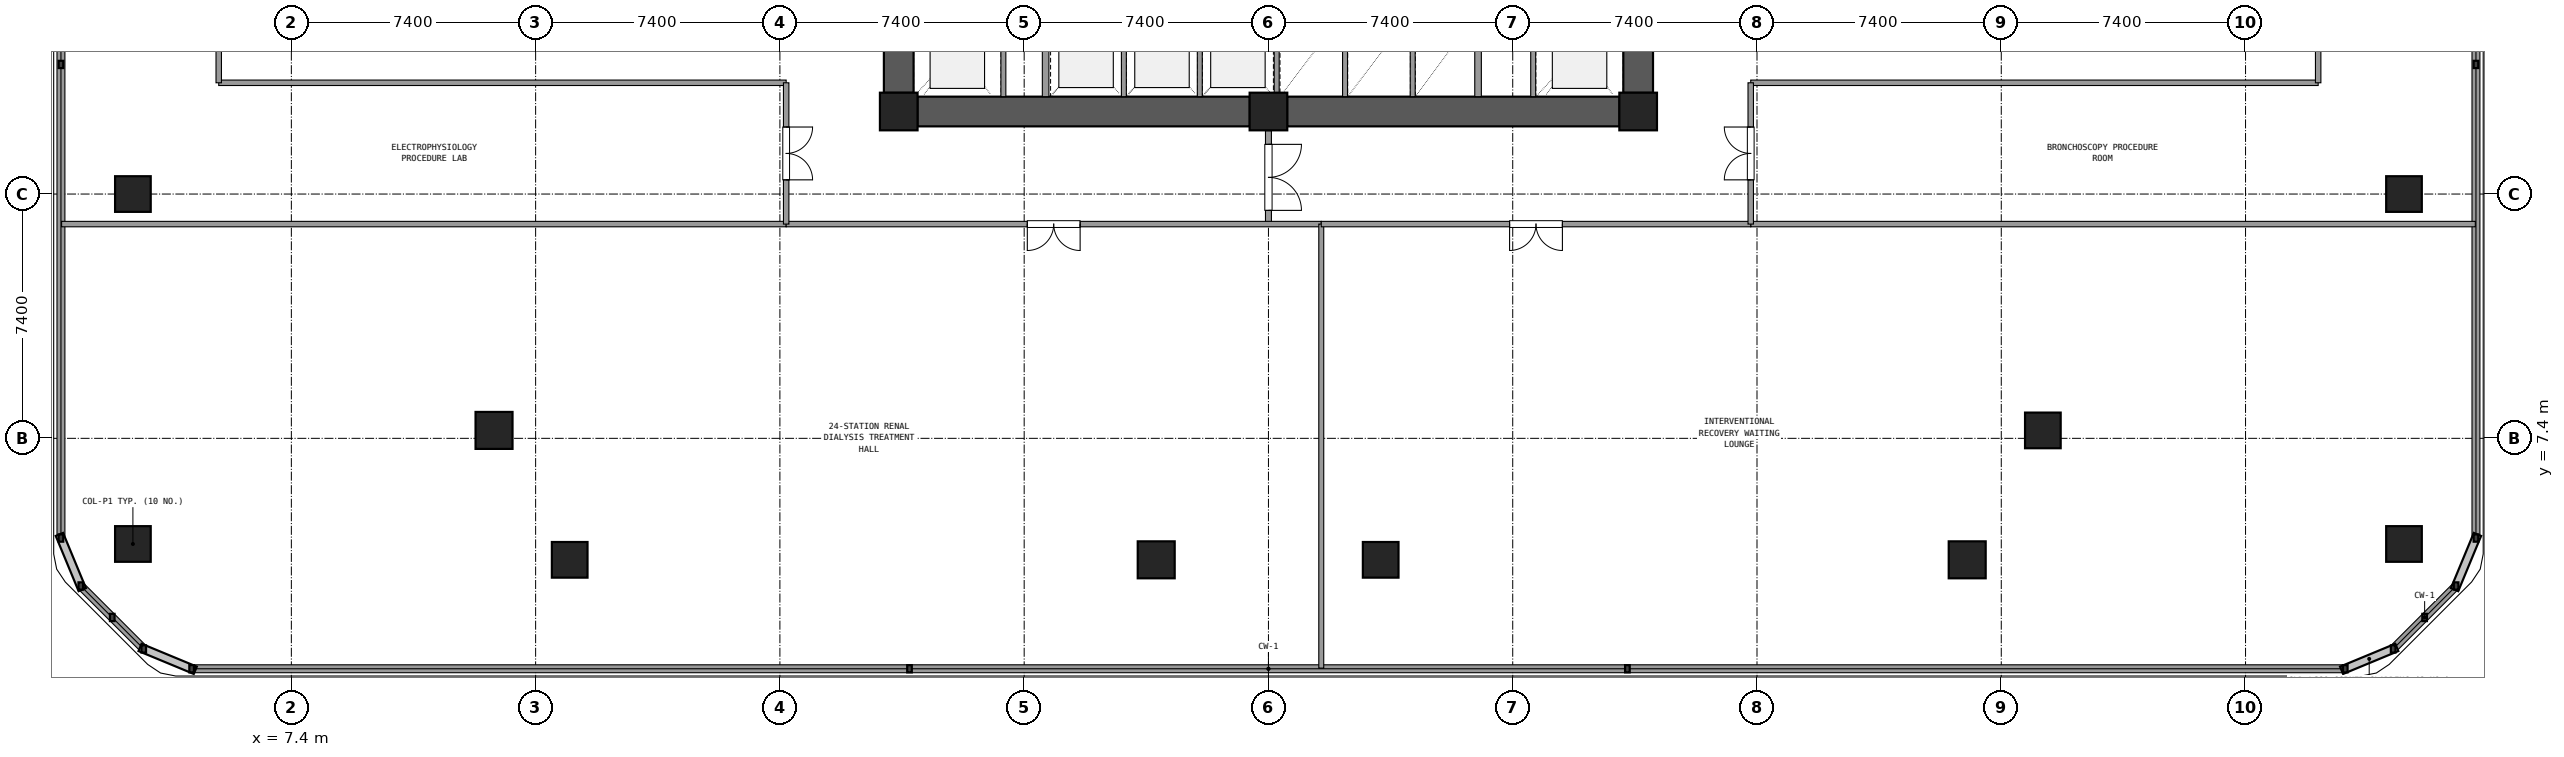
"""IFC4 building model, lengths in metres.
Left out: names, types, materials, properties, quantities, classifications, styles, units other than length and angle.
Written with IfcOpenShell. Run it as: python <this file> out.ifc"""

import sys

from ifc_helpers import new_model, si_unit, direction, frame, frame_2d, origin, origin_2d, place, context, subcontext, project, spatial, rectangle, circle, extrude, element, fill, save


model = new_model("IFC4")
c1 = context("Model", 3, precision=1e-05, world=origin(), true_north=direction((0.0, 1.0)))
c2 = subcontext(c1, "Body", "Model", "MODEL_VIEW")
j1 = project(units=[si_unit("LENGTHUNIT", "METRE"), si_unit("PLANEANGLEUNIT", "RADIAN")], contexts=[c1])
p1 = place(None, origin())
s1 = spatial("IfcSite", under=j1, at=p1, CompositionType="ELEMENT")
p2 = place(p1, origin())
s2 = spatial("IfcBuilding", under=s1, at=p2, CompositionType="ELEMENT")
p3 = place(p2, frame((0.0, 0.0, 14.4)))
s3 = spatial("IfcBuildingStorey", under=s2, at=p3, CompositionType="ELEMENT", Elevation=14.4)
for number, where, z_axis, x_axis in (
    (1, (25.8, 17.3, 0.0), (0.0, 0.0, 1.0), (1.0, 0.0, 0.0)),
    (2, (37.0, 17.3, 0.0), (0.0, 0.0, 1.0), (1.0, 0.0, 0.0)),
    (3, (48.2, 17.3, 0.0), (0.0, 0.0, 1.0), (1.0, 0.0, 0.0)),
):
    element("IfcColumn", number, at=place(p3, frame(where, z_axis=z_axis, x_axis=x_axis)), inside=s3, PredefinedType="COLUMN", context=c2, shape_type="SweptSolid", body=[
        extrude(rectangle(XDim=1.14, YDim=1.14, at=origin_2d()), origin(), (0.0, 0.0, 1.0), 4.5),
    ])
for number, where, z_axis, x_axis in (
    (4, (26.365, 17.3, 0.0), (0.0, 0.0, 1.0), (1.0, 0.0, 0.0)),
    (5, (37.565, 17.3, 0.0), (0.0, 0.0, 1.0), (1.0, 0.0, 0.0)),
):
    element("IfcWall", number, at=place(p3, frame(where, z_axis=z_axis, x_axis=x_axis)), inside=s3, PredefinedType="SHEAR", context=c2, shape_type="SweptSolid", body=[
        extrude(rectangle(XDim=10.07, YDim=0.9, at=frame_2d((5.035, 0.0))), origin(), (0.0, 0.0, 1.0), 4.2),
    ])
p4 = place(p3, frame((48.2, 17.865, 0.0), z_axis=(0.0, 0.0, 1.0), x_axis=(0.0, 1.0, 0.0)))
e6 = element("IfcWall", 6, at=p4, inside=s3, PredefinedType="SHEAR", context=c2, shape_type="SweptSolid", body=[
    extrude(rectangle(XDim=7.47, YDim=0.9, at=frame_2d((3.735, 0.0))), origin(), (0.0, 0.0, 1.0), 4.2),
])
p5 = place(p4, frame((4.185, 0.0, 0.0)))
e7 = element("IfcOpeningElement", 7, at=p5, cuts=e6, PredefinedType="OPENING", context=c2, shape_type="SweptSolid", body=[
    extrude(rectangle(XDim=1.2, YDim=2.15, at=frame_2d((0.6, 1.075))), frame((0.0, 0.46, 0.0), z_axis=(0.0, -1.0, 0.0), x_axis=(1.0, 0.0, 0.0)), (0.0, 0.0, 1.0), 0.92),
])
p6 = place(p3, frame((25.8, 25.335, 0.0), z_axis=(0.0, 0.0, 1.0), x_axis=(0.0, -1.0, 0.0)))
e8 = element("IfcWall", 8, at=p6, inside=s3, PredefinedType="SHEAR", context=c2, shape_type="SweptSolid", body=[
    extrude(rectangle(XDim=7.47, YDim=0.9, at=frame_2d((3.735, 0.0))), origin(), (0.0, 0.0, 1.0), 4.2),
])
p7 = place(p6, frame((2.085, 0.0, 0.0)))
e9 = element("IfcOpeningElement", 9, at=p7, cuts=e8, PredefinedType="OPENING", context=c2, shape_type="SweptSolid", body=[
    extrude(rectangle(XDim=1.2, YDim=2.15, at=frame_2d((0.6, 1.075))), frame((0.0, 0.46, 0.0), z_axis=(0.0, -1.0, 0.0), x_axis=(1.0, 0.0, 0.0)), (0.0, 0.0, 1.0), 0.92),
])
p8 = place(p3, frame((13.54, 7.64, 0.0), z_axis=(0.0, 0.0, 1.0), x_axis=(1.0, 0.0, 0.0)))
e10 = element("IfcColumn", 10, at=p8, inside=s3, PredefinedType="COLUMN", context=c2, shape_type="SweptSolid", body=[
    extrude(circle(Radius=0.56, at=origin_2d()), origin(), (0.0, 0.0, 1.0), 4.5),
])
p9 = place(p3, frame((15.832, 3.72, 0.0), z_axis=(0.0, 0.0, 1.0), x_axis=(1.0, 0.0, 0.0)))
e11 = element("IfcColumn", 11, at=p9, inside=s3, PredefinedType="COLUMN", context=c2, shape_type="SweptSolid", body=[
    extrude(rectangle(XDim=1.08, YDim=1.08, at=origin_2d()), origin(), (0.0, 0.0, 1.0), 4.5),
])
p10 = place(p3, frame((33.6, 3.72, 0.0), z_axis=(0.0, 0.0, 1.0), x_axis=(1.0, 0.0, 0.0)))
e12 = element("IfcColumn", 12, at=p10, inside=s3, PredefinedType="COLUMN", context=c2, shape_type="SweptSolid", body=[
    extrude(circle(Radius=0.56, at=origin_2d()), origin(), (0.0, 0.0, 1.0), 4.5),
])
p11 = place(p3, frame((40.4, 3.72, 0.0), z_axis=(0.0, 0.0, 1.0), x_axis=(1.0, 0.0, 0.0)))
e13 = element("IfcColumn", 13, at=p11, inside=s3, PredefinedType="COLUMN", context=c2, shape_type="SweptSolid", body=[
    extrude(rectangle(XDim=1.08, YDim=1.08, at=origin_2d()), origin(), (0.0, 0.0, 1.0), 4.5),
])
p12 = place(p3, frame((58.168, 3.72, 0.0), z_axis=(0.0, 0.0, 1.0), x_axis=(1.0, 0.0, 0.0)))
e14 = element("IfcColumn", 14, at=p12, inside=s3, PredefinedType="COLUMN", context=c2, shape_type="SweptSolid", body=[
    extrude(circle(Radius=0.56, at=origin_2d()), origin(), (0.0, 0.0, 1.0), 4.5),
])
for number, where, z_axis, x_axis in (
    (15, (60.46, 7.64, 0.0), (0.0, 0.0, 1.0), (1.0, 0.0, 0.0)),
    (16, (2.6, 4.2, 0.0), (0.0, 0.0, 1.0), (1.0, 0.0, 0.0)),
    (17, (2.6, 14.8, 0.0), (0.0, 0.0, 1.0), (1.0, 0.0, 0.0)),
    (18, (71.4, 4.2, 0.0), (0.0, 0.0, 1.0), (1.0, 0.0, 0.0)),
    (19, (71.4, 14.8, 0.0), (0.0, 0.0, 1.0), (1.0, 0.0, 0.0)),
):
    element("IfcColumn", number, at=place(p3, frame(where, z_axis=z_axis, x_axis=x_axis)), inside=s3, PredefinedType="COLUMN", context=c2, shape_type="SweptSolid", body=[
        extrude(rectangle(XDim=1.08, YDim=1.08, at=origin_2d()), origin(), (0.0, 0.0, 1.0), 4.5),
    ])
p13 = place(p3, frame((4.379, 0.42, 0.0), z_axis=(0.0, 0.0, 1.0), x_axis=(1.0, 0.0, 0.0)))
e20 = element("IfcWall", 20, at=p13, inside=s3, PredefinedType="SOLIDWALL", context=c2, shape_type="SweptSolid", body=[
    extrude(rectangle(XDim=65.242, YDim=0.24, at=frame_2d((32.621, 0.0))), origin(), (0.0, 0.0, 1.0), 0.85),
])
p14 = place(p3, frame((71.072, 1.021, 0.0), z_axis=(0.0, 0.0, 1.0), x_axis=(0.707106781187, 0.707106781187, 0.0)))
e21 = element("IfcWall", 21, at=p14, inside=s3, PredefinedType="SOLIDWALL", context=c2, shape_type="SweptSolid", body=[
    extrude(rectangle(XDim=2.697, YDim=0.24, at=frame_2d((1.348, 0.0))), origin(), (0.0, 0.0, 1.0), 0.85),
])
for number, where, z_axis, x_axis in (
    (22, (73.58, 4.379, 0.0), (0.0, 0.0, 1.0), (0.0, 1.0, 0.0)),
    (23, (0.42, 47.421, 0.0), (0.0, 0.0, 1.0), (0.0, -1.0, 0.0)),
):
    element("IfcWall", number, at=place(p3, frame(where, z_axis=z_axis, x_axis=x_axis)), inside=s3, PredefinedType="SOLIDWALL", context=c2, shape_type="SweptSolid", body=[
        extrude(rectangle(XDim=43.042, YDim=0.24, at=frame_2d((21.521, 0.0))), origin(), (0.0, 0.0, 1.0), 0.85),
    ])
p15 = place(p3, frame((1.021, 2.928, 0.0), z_axis=(0.0, 0.0, 1.0), x_axis=(0.707106781187, -0.707106781187, 0.0)))
e24 = element("IfcWall", 24, at=p15, inside=s3, PredefinedType="SOLIDWALL", context=c2, shape_type="SweptSolid", body=[
    extrude(rectangle(XDim=2.697, YDim=0.24, at=frame_2d((1.348, 0.0))), origin(), (0.0, 0.0, 1.0), 0.85),
])
p16 = place(p3, frame((30.25, 17.75, 0.0), z_axis=(0.0, 0.0, 1.0), x_axis=(0.0, 1.0, 0.0)))
e25 = element("IfcWall", 25, at=p16, inside=s3, PredefinedType="SOLIDWALL", context=c2, shape_type="SweptSolid", body=[
    extrude(rectangle(XDim=6.9, YDim=0.2, at=frame_2d((3.45, 0.0))), origin(), (0.0, 0.0, 1.0), 3.21),
])
p17 = place(p16, frame((4.15, 0.0, 0.0)))
e26 = element("IfcOpeningElement", 26, at=p17, cuts=e25, PredefinedType="OPENING", context=c2, shape_type="SweptSolid", body=[
    extrude(rectangle(XDim=1.2, YDim=2.15, at=frame_2d((0.6, 1.075))), frame((0.0, 0.11, 0.0), z_axis=(0.0, -1.0, 0.0), x_axis=(1.0, 0.0, 0.0)), (0.0, 0.0, 1.0), 0.22),
])
p18 = place(p3, frame((28.97, 17.75, 0.0), z_axis=(0.0, 0.0, 1.0), x_axis=(0.0, 1.0, 0.0)))
e27 = element("IfcWall", 27, at=p18, inside=s3, PredefinedType="PARTITIONING", context=c2, shape_type="SweptSolid", body=[
    extrude(rectangle(XDim=2.95, YDim=0.15, at=frame_2d((1.475, 0.0))), origin(), (0.0, 0.0, 1.0), 3.21),
])
p19 = place(p3, frame((43.35, 17.75, 0.0), z_axis=(0.0, 0.0, 1.0), x_axis=(0.0, 1.0, 0.0)))
e28 = element("IfcWall", 28, at=p19, inside=s3, PredefinedType="SOLIDWALL", context=c2, shape_type="SweptSolid", body=[
    extrude(rectangle(XDim=6.9, YDim=0.2, at=frame_2d((3.45, 0.0))), origin(), (0.0, 0.0, 1.0), 3.21),
])
p20 = place(p19, frame((4.15, 0.0, 0.0)))
e29 = element("IfcOpeningElement", 29, at=p20, cuts=e28, PredefinedType="OPENING", context=c2, shape_type="SweptSolid", body=[
    extrude(rectangle(XDim=1.2, YDim=2.15, at=frame_2d((0.6, 1.075))), frame((0.0, 0.11, 0.0), z_axis=(0.0, -1.0, 0.0), x_axis=(1.0, 0.0, 0.0)), (0.0, 0.0, 1.0), 0.22),
])
p21 = place(p3, frame((45.02, 17.75, 0.0), z_axis=(0.0, 0.0, 1.0), x_axis=(0.0, 1.0, 0.0)))
e30 = element("IfcWall", 30, at=p21, inside=s3, PredefinedType="PARTITIONING", context=c2, shape_type="SweptSolid", body=[
    extrude(rectangle(XDim=2.95, YDim=0.15, at=frame_2d((1.475, 0.0))), origin(), (0.0, 0.0, 1.0), 3.21),
])
for number, where, z_axis, x_axis in (
    (31, (32.62, 17.75, 0.0), (0.0, 0.0, 1.0), (0.0, 1.0, 0.0)),
    (32, (34.92, 17.75, 0.0), (0.0, 0.0, 1.0), (0.0, 1.0, 0.0)),
    (33, (39.32, 17.75, 0.0), (0.0, 0.0, 1.0), (0.0, 1.0, 0.0)),
    (34, (41.37, 17.75, 0.0), (0.0, 0.0, 1.0), (0.0, 1.0, 0.0)),
):
    element("IfcWall", number, at=place(p3, frame(where, z_axis=z_axis, x_axis=x_axis)), inside=s3, PredefinedType="PARTITIONING", context=c2, shape_type="SweptSolid", body=[
        extrude(rectangle(XDim=2.61, YDim=0.15, at=frame_2d((1.305, 0.0))), origin(), (0.0, 0.0, 1.0), 3.21),
    ])
p22 = place(p3, frame((37.25, 17.75, 0.0), z_axis=(0.0, 0.0, 1.0), x_axis=(0.0, 1.0, 0.0)))
e35 = element("IfcWall", 35, at=p22, inside=s3, PredefinedType="PARTITIONING", context=c2, shape_type="SweptSolid", body=[
    extrude(rectangle(XDim=2.73, YDim=0.15, at=frame_2d((1.365, 0.0))), origin(), (0.0, 0.0, 1.0), 3.21),
])
p23 = place(p3, frame((37.0, 13.89, 0.0), z_axis=(0.0, 0.0, 1.0), x_axis=(0.0, 1.0, 0.0)))
e36 = element("IfcWall", 36, at=p23, inside=s3, PredefinedType="PARTITIONING", context=c2, shape_type="SweptSolid", body=[
    extrude(rectangle(XDim=2.83, YDim=0.18, at=frame_2d((1.415, 0.0))), origin(), (0.0, 0.0, 1.0), 3.21),
])
p24 = place(p23, frame((0.415, 0.0, 0.0)))
e37 = element("IfcOpeningElement", 37, at=p24, cuts=e36, PredefinedType="OPENING", context=c2, shape_type="SweptSolid", body=[
    extrude(rectangle(XDim=2.0, YDim=2.2, at=frame_2d((1.0, 1.1))), frame((0.0, 0.1, 0.0), z_axis=(0.0, -1.0, 0.0), x_axis=(1.0, 0.0, 0.0)), (0.0, 0.0, 1.0), 0.2),
])
for number, where, z_axis, x_axis in (
    (38, (0.44, 13.89, 0.0), (0.0, 0.0, 1.0), (1.0, 0.0, 0.0)),
    (39, (51.61, 13.89, 0.0), (0.0, 0.0, 1.0), (1.0, 0.0, 0.0)),
):
    element("IfcWall", number, at=place(p3, frame(where, z_axis=z_axis, x_axis=x_axis)), inside=s3, PredefinedType="PARTITIONING", context=c2, shape_type="SweptSolid", body=[
        extrude(rectangle(XDim=21.95, YDim=0.165, at=frame_2d((10.975, 0.0))), origin(), (0.0, 0.0, 1.0), 3.21),
    ])
p25 = place(p3, frame((5.2, 18.17, 0.0), z_axis=(0.0, 0.0, 1.0), x_axis=(1.0, 0.0, 0.0)))
e40 = element("IfcWall", 40, at=p25, inside=s3, PredefinedType="PARTITIONING", context=c2, shape_type="SweptSolid", body=[
    extrude(rectangle(XDim=17.19, YDim=0.165, at=frame_2d((8.595, 0.0))), origin(), (0.0, 0.0, 1.0), 3.21),
])
p26 = place(p3, frame((5.2, 18.17, 0.0), z_axis=(0.0, 0.0, 1.0), x_axis=(0.0, 1.0, 0.0)))
e41 = element("IfcWall", 41, at=p26, inside=s3, PredefinedType="PARTITIONING", context=c2, shape_type="SweptSolid", body=[
    extrude(rectangle(XDim=2.93, YDim=0.165, at=frame_2d((1.465, 0.0))), origin(), (0.0, 0.0, 1.0), 3.21),
])
p27 = place(p3, frame((51.61, 18.17, 0.0), z_axis=(0.0, 0.0, 1.0), x_axis=(1.0, 0.0, 0.0)))
e42 = element("IfcWall", 42, at=p27, inside=s3, PredefinedType="PARTITIONING", context=c2, shape_type="SweptSolid", body=[
    extrude(rectangle(XDim=17.19, YDim=0.165, at=frame_2d((8.595, 0.0))), origin(), (0.0, 0.0, 1.0), 3.21),
])
p28 = place(p3, frame((68.8, 18.17, 0.0), z_axis=(0.0, 0.0, 1.0), x_axis=(0.0, 1.0, 0.0)))
e43 = element("IfcWall", 43, at=p28, inside=s3, PredefinedType="PARTITIONING", context=c2, shape_type="SweptSolid", body=[
    extrude(rectangle(XDim=2.93, YDim=0.165, at=frame_2d((1.465, 0.0))), origin(), (0.0, 0.0, 1.0), 3.21),
])
p29 = place(p3, frame((22.39, 13.89, 0.0), z_axis=(0.0, 0.0, 1.0), x_axis=(1.0, 0.0, 0.0)))
e44 = element("IfcWall", 44, at=p29, inside=s3, PredefinedType="PARTITIONING", context=c2, shape_type="SweptSolid", body=[
    extrude(rectangle(XDim=16.21, YDim=0.165, at=frame_2d((8.105, 0.0))), origin(), (0.0, 0.0, 1.0), 3.21),
])
p30 = place(p29, frame((7.305, 0.0, 0.0)))
e45 = element("IfcOpeningElement", 45, at=p30, cuts=e44, PredefinedType="OPENING", context=c2, shape_type="SweptSolid", body=[
    extrude(rectangle(XDim=1.6, YDim=2.2, at=frame_2d((0.8, 1.1))), frame((0.0, 0.093, 0.0), z_axis=(0.0, -1.0, 0.0), x_axis=(1.0, 0.0, 0.0)), (0.0, 0.0, 1.0), 0.185),
])
p31 = place(p3, frame((38.6, 0.44, 0.0), z_axis=(0.0, 0.0, 1.0), x_axis=(0.0, 1.0, 0.0)))
e46 = element("IfcWall", 46, at=p31, inside=s3, PredefinedType="PARTITIONING", context=c2, shape_type="SweptSolid", body=[
    extrude(rectangle(XDim=13.45, YDim=0.15, at=frame_2d((6.725, 0.0))), origin(), (0.0, 0.0, 1.0), 3.21),
])
p32 = place(p3, frame((38.6, 13.89, 0.0), z_axis=(0.0, 0.0, 1.0), x_axis=(1.0, 0.0, 0.0)))
e47 = element("IfcWall", 47, at=p32, inside=s3, PredefinedType="PARTITIONING", context=c2, shape_type="SweptSolid", body=[
    extrude(rectangle(XDim=13.01, YDim=0.165, at=frame_2d((6.505, 0.0))), origin(), (0.0, 0.0, 1.0), 3.21),
])
p33 = place(p32, frame((5.705, 0.0, 0.0)))
e48 = element("IfcOpeningElement", 48, at=p33, cuts=e47, PredefinedType="OPENING", context=c2, shape_type="SweptSolid", body=[
    extrude(rectangle(XDim=1.6, YDim=2.2, at=frame_2d((0.8, 1.1))), frame((0.0, 0.093, 0.0), z_axis=(0.0, -1.0, 0.0), x_axis=(1.0, 0.0, 0.0)), (0.0, 0.0, 1.0), 0.185),
])
p34 = place(p3, frame((22.39, 13.89, 0.0), z_axis=(0.0, 0.0, 1.0), x_axis=(0.0, 1.0, 0.0)))
e49 = element("IfcWall", 49, at=p34, inside=s3, PredefinedType="PARTITIONING", context=c2, shape_type="SweptSolid", body=[
    extrude(rectangle(XDim=4.28, YDim=0.165, at=frame_2d((2.14, 0.0))), origin(), (0.0, 0.0, 1.0), 3.21),
])
p35 = place(p34, frame((1.34, 0.0, 0.0)))
e50 = element("IfcOpeningElement", 50, at=p35, cuts=e49, PredefinedType="OPENING", context=c2, shape_type="SweptSolid", body=[
    extrude(rectangle(XDim=1.6, YDim=2.2, at=frame_2d((0.8, 1.1))), frame((0.0, 0.093, 0.0), z_axis=(0.0, -1.0, 0.0), x_axis=(1.0, 0.0, 0.0)), (0.0, 0.0, 1.0), 0.185),
])
p36 = place(p3, frame((51.61, 13.89, 0.0), z_axis=(0.0, 0.0, 1.0), x_axis=(0.0, 1.0, 0.0)))
e51 = element("IfcWall", 51, at=p36, inside=s3, PredefinedType="PARTITIONING", context=c2, shape_type="SweptSolid", body=[
    extrude(rectangle(XDim=4.28, YDim=0.165, at=frame_2d((2.14, 0.0))), origin(), (0.0, 0.0, 1.0), 3.21),
])
p37 = place(p36, frame((1.34, 0.0, 0.0)))
e52 = element("IfcOpeningElement", 52, at=p37, cuts=e51, PredefinedType="OPENING", context=c2, shape_type="SweptSolid", body=[
    extrude(rectangle(XDim=1.6, YDim=2.2, at=frame_2d((0.8, 1.1))), frame((0.0, 0.093, 0.0), z_axis=(0.0, -1.0, 0.0), x_axis=(1.0, 0.0, 0.0)), (0.0, 0.0, 1.0), 0.185),
])
p38 = place(p24, frame((2.0, 0.0, 0.0), z_axis=(0.0, 0.0, 1.0), x_axis=(-1.0, 0.0, 0.0)))
e53 = element("IfcDoor", 53, at=p38, inside=s3, OperationType="DOUBLE_DOOR_SINGLE_SWING", PredefinedType="DOOR", context=c2, shape_type="SweptSolid", body=[
    extrude(rectangle(XDim=2.0, YDim=2.2, at=frame_2d((1.0, 1.1))), frame((0.0, 0.025, 0.0), z_axis=(0.0, -1.0, 0.0), x_axis=(1.0, 0.0, 0.0)), (0.0, 0.0, 1.0), 0.05),
])
fill(e37, e53)
p39 = place(p30, frame((1.6, 0.0, 0.0), z_axis=(0.0, 0.0, 1.0), x_axis=(-1.0, 0.0, 0.0)))
e54 = element("IfcDoor", 54, at=p39, inside=s3, OperationType="DOUBLE_DOOR_SINGLE_SWING", PredefinedType="DOOR", context=c2, shape_type="SweptSolid", body=[
    extrude(rectangle(XDim=1.6, YDim=2.2, at=frame_2d((0.8, 1.1))), frame((0.0, 0.025, 0.0), z_axis=(0.0, -1.0, 0.0), x_axis=(1.0, 0.0, 0.0)), (0.0, 0.0, 1.0), 0.05),
])
fill(e45, e54)
p40 = place(p33, frame((1.6, 0.0, 0.0), z_axis=(0.0, 0.0, 1.0), x_axis=(-1.0, 0.0, 0.0)))
e55 = element("IfcDoor", 55, at=p40, inside=s3, OperationType="DOUBLE_DOOR_SINGLE_SWING", PredefinedType="DOOR", context=c2, shape_type="SweptSolid", body=[
    extrude(rectangle(XDim=1.6, YDim=2.2, at=frame_2d((0.8, 1.1))), frame((0.0, 0.025, 0.0), z_axis=(0.0, -1.0, 0.0), x_axis=(1.0, 0.0, 0.0)), (0.0, 0.0, 1.0), 0.05),
])
fill(e48, e55)
p41 = place(p35, frame((1.6, 0.0, 0.0), z_axis=(0.0, 0.0, 1.0), x_axis=(-1.0, 0.0, 0.0)))
e56 = element("IfcDoor", 56, at=p41, inside=s3, OperationType="DOUBLE_DOOR_SINGLE_SWING", PredefinedType="DOOR", context=c2, shape_type="SweptSolid", body=[
    extrude(rectangle(XDim=1.6, YDim=2.2, at=frame_2d((0.8, 1.1))), frame((0.0, 0.025, 0.0), z_axis=(0.0, -1.0, 0.0), x_axis=(1.0, 0.0, 0.0)), (0.0, 0.0, 1.0), 0.05),
])
fill(e50, e56)
p42 = place(p37, origin())
e57 = element("IfcDoor", 57, at=p42, inside=s3, OperationType="DOUBLE_DOOR_SINGLE_SWING", PredefinedType="DOOR", context=c2, shape_type="SweptSolid", body=[
    extrude(rectangle(XDim=1.6, YDim=2.2, at=frame_2d((0.8, 1.1))), frame((0.0, 0.025, 0.0), z_axis=(0.0, -1.0, 0.0), x_axis=(1.0, 0.0, 0.0)), (0.0, 0.0, 1.0), 0.05),
])
fill(e52, e57)
save(model, sys.argv[1])
